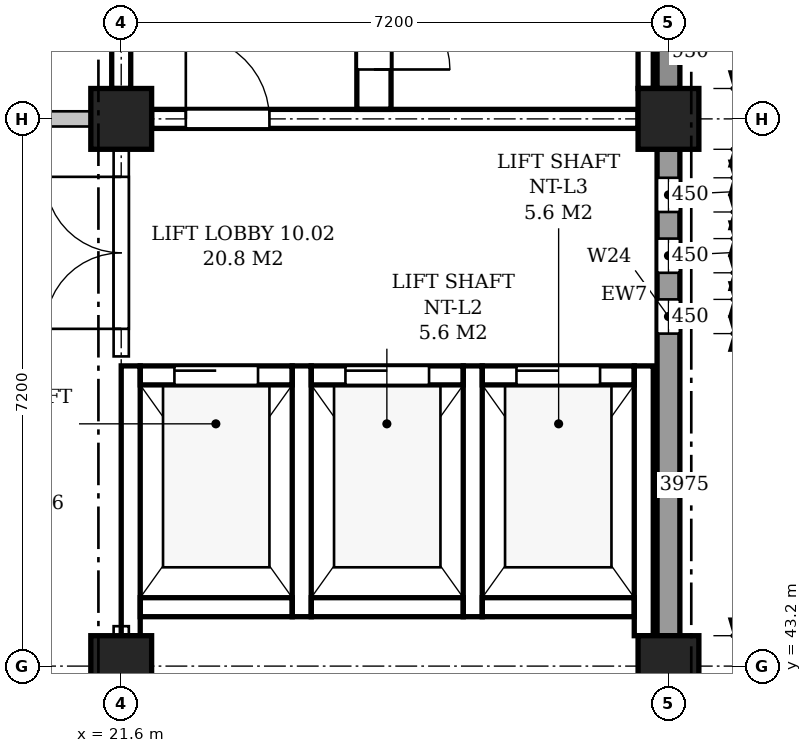
"""IFC4 building model, lengths in metres.
Left out: names, types, materials, properties, quantities, classifications, styles, units other than length and angle.
Written with IfcOpenShell. Run it as: python <this file> out.ifc"""

import sys

from ifc_helpers import new_model, si_unit, direction, frame, frame_2d, origin, origin_2d, place, context, subcontext, project, spatial, polyline, rectangle, outline, extrude, element, fill, save


model = new_model("IFC4")
c1 = context("Model", 3, precision=1e-05, world=origin(), true_north=direction((0.0, 1.0)))
c2 = subcontext(c1, "Body", "Model", "MODEL_VIEW")
j1 = project(units=[si_unit("LENGTHUNIT", "METRE"), si_unit("PLANEANGLEUNIT", "RADIAN")], contexts=[c1])
p1 = place(None, origin())
s1 = spatial("IfcSite", under=j1, at=p1, CompositionType="ELEMENT")
p2 = place(p1, origin())
s2 = spatial("IfcBuilding", under=s1, at=p2, CompositionType="ELEMENT")
p3 = place(p2, frame((0.0, 0.0, 49.8)))
s3 = spatial("IfcBuildingStorey", under=s2, at=p3, CompositionType="ELEMENT", Elevation=49.8)
for number, where, z_axis, x_axis in (
    (1, (21.6, 43.2, 0.0), (0.0, 0.0, 1.0), (1.0, 0.0, 0.0)),
    (2, (21.6, 50.4, 0.0), (0.0, 0.0, 1.0), (1.0, 0.0, 0.0)),
    (3, (28.8, 43.2, 0.0), (0.0, 0.0, 1.0), (1.0, 0.0, 0.0)),
    (4, (28.8, 50.4, 0.0), (0.0, 0.0, 1.0), (1.0, 0.0, 0.0)),
):
    element("IfcColumn", number, at=place(p3, frame(where, z_axis=z_axis, x_axis=x_axis)), inside=s3, PredefinedType="COLUMN", context=c2, shape_type="SweptSolid", body=[
        extrude(rectangle(XDim=0.8, YDim=0.8, at=origin_2d()), origin(), (0.0, 0.0, 1.0), 4.5),
    ])
p4 = place(p3, frame((28.8, 43.6, 0.0), z_axis=(0.0, 0.0, 1.0), x_axis=(0.0, 1.0, 0.0)))
e5 = element("IfcWall", 5, at=p4, inside=s3, PredefinedType="STANDARD", context=c2, shape_type="SweptSolid", body=[
    extrude(rectangle(XDim=6.4, YDim=0.3, at=frame_2d((3.2, 0.0))), origin(), (0.0, 0.0, 1.0), 3.6),
])
p5 = place(p4, frame((3.975, 0.0, 0.9)))
e6 = element("IfcOpeningElement", 6, at=p5, cuts=e5, PredefinedType="OPENING", context=c2, shape_type="SweptSolid", body=[
    extrude(outline(polyline([(0.0, 0.0), (0.45, 0.0), (0.45, 2.35), (0.225, 2.6), (0.0, 2.35), (0.0, 0.0)])), frame((0.0, 0.16, 0.0), z_axis=(0.0, -1.0, 0.0), x_axis=(1.0, 0.0, 0.0)), (0.0, 0.0, 1.0), 0.32),
])
p6 = place(p4, frame((4.775, 0.0, 0.9)))
e7 = element("IfcOpeningElement", 7, at=p6, cuts=e5, PredefinedType="OPENING", context=c2, shape_type="SweptSolid", body=[
    extrude(outline(polyline([(0.0, 0.0), (0.45, 0.0), (0.45, 2.35), (0.225, 2.6), (0.0, 2.35), (0.0, 0.0)])), frame((0.0, 0.16, 0.0), z_axis=(0.0, -1.0, 0.0), x_axis=(1.0, 0.0, 0.0)), (0.0, 0.0, 1.0), 0.32),
])
p7 = place(p4, frame((5.575, 0.0, 0.9)))
e8 = element("IfcOpeningElement", 8, at=p7, cuts=e5, PredefinedType="OPENING", context=c2, shape_type="SweptSolid", body=[
    extrude(outline(polyline([(0.0, 0.0), (0.45, 0.0), (0.45, 2.35), (0.225, 2.6), (0.0, 2.35), (0.0, 0.0)])), frame((0.0, 0.16, 0.0), z_axis=(0.0, -1.0, 0.0), x_axis=(1.0, 0.0, 0.0)), (0.0, 0.0, 1.0), 0.32),
])
p8 = place(p3, frame((28.8, 50.8, 0.0), z_axis=(0.0, 0.0, 1.0), x_axis=(0.0, 1.0, 0.0)))
e9 = element("IfcWall", 9, at=p8, inside=s3, PredefinedType="STANDARD", context=c2, shape_type="SweptSolid", body=[
    extrude(rectangle(XDim=6.4, YDim=0.3, at=frame_2d((3.2, 0.0))), origin(), (0.0, 0.0, 1.0), 3.6),
])
p9 = place(p8, frame((0.95, 0.0, 0.9)))
e10 = element("IfcOpeningElement", 10, at=p9, cuts=e9, PredefinedType="OPENING", context=c2, shape_type="SweptSolid", body=[
    extrude(outline(polyline([(0.0, 0.0), (0.9, 0.0), (0.9, 2.15), (0.45, 2.6), (0.0, 2.15), (0.0, 0.0)])), frame((0.0, 0.16, 0.0), z_axis=(0.0, -1.0, 0.0), x_axis=(1.0, 0.0, 0.0)), (0.0, 0.0, 1.0), 0.32),
])
p10 = place(p8, frame((4.55, 0.0, 0.9)))
e11 = element("IfcOpeningElement", 11, at=p10, cuts=e9, PredefinedType="OPENING", context=c2, shape_type="SweptSolid", body=[
    extrude(outline(polyline([(0.0, 0.0), (0.9, 0.0), (0.9, 2.15), (0.45, 2.6), (0.0, 2.15), (0.0, 0.0)])), frame((0.0, 0.16, 0.0), z_axis=(0.0, -1.0, 0.0), x_axis=(1.0, 0.0, 0.0)), (0.0, 0.0, 1.0), 0.32),
])
p11 = place(p3, frame((22.0, 50.4, 0.0), z_axis=(0.0, 0.0, 1.0), x_axis=(1.0, 0.0, 0.0)))
e12 = element("IfcWall", 12, at=p11, inside=s3, PredefinedType="SHEAR", context=c2, shape_type="SweptSolid", body=[
    extrude(rectangle(XDim=6.4, YDim=0.25, at=frame_2d((3.2, 0.0))), origin(), (0.0, 0.0, 1.0), 3.55),
])
p12 = place(p11, frame((0.45, 0.0, 0.0)))
e13 = element("IfcOpeningElement", 13, at=p12, cuts=e12, PredefinedType="OPENING", context=c2, shape_type="SweptSolid", body=[
    extrude(rectangle(XDim=1.1, YDim=2.1, at=frame_2d((0.55, 1.05))), frame((0.0, 0.135, 0.0), z_axis=(0.0, -1.0, 0.0), x_axis=(1.0, 0.0, 0.0)), (0.0, 0.0, 1.0), 0.27),
])
p13 = place(p3, frame((21.6, 50.8, 0.0), z_axis=(0.0, 0.0, 1.0), x_axis=(0.0, 1.0, 0.0)))
e14 = element("IfcWall", 14, at=p13, inside=s3, PredefinedType="SHEAR", context=c2, shape_type="SweptSolid", body=[
    extrude(rectangle(XDim=6.4, YDim=0.25, at=frame_2d((3.2, 0.0))), origin(), (0.0, 0.0, 1.0), 3.55),
])
p14 = place(p3, frame((28.5, 50.8, -0.25), z_axis=(0.0, 0.0, 1.0), x_axis=(0.0, 1.0, 0.0)))
e15 = element("IfcWall", 15, at=p14, inside=s3, PredefinedType="SHEAR", context=c2, shape_type="SweptSolid", body=[
    extrude(rectangle(XDim=0.95, YDim=0.2, at=frame_2d((0.475, 0.0))), origin(), (0.0, 0.0, 1.0), 4.45),
])
p15 = place(p3, frame((24.925, 50.525, 0.0), z_axis=(0.0, 0.0, 1.0), x_axis=(0.0, 1.0, 0.0)))
e16 = element("IfcWall", 16, at=p15, inside=s3, PredefinedType="SHEAR", context=c2, shape_type="SweptSolid", body=[
    extrude(rectangle(XDim=6.925, YDim=0.45, at=frame_2d((3.462, 0.0))), origin(), (0.0, 0.0, 1.0), 4.2),
])
p16 = place(p15, frame((0.525, 0.0, 0.0)))
e17 = element("IfcOpeningElement", 17, at=p16, cuts=e16, PredefinedType="OPENING", context=c2, shape_type="SweptSolid", body=[
    extrude(rectangle(XDim=1.0, YDim=2.1, at=frame_2d((0.5, 1.05))), frame((0.0, 0.235, 0.0), z_axis=(0.0, -1.0, 0.0), x_axis=(1.0, 0.0, 0.0)), (0.0, 0.0, 1.0), 0.47),
])
p17 = place(p3, frame((21.725, 43.6, -0.25), z_axis=(0.0, 0.0, 1.0), x_axis=(0.0, 1.0, 0.0)))
e18 = element("IfcWall", 18, at=p17, inside=s3, PredefinedType="SHEAR", context=c2, shape_type="SweptSolid", body=[
    extrude(rectangle(XDim=3.55, YDim=0.25, at=frame_2d((1.775, 0.0))), origin(), (0.0, 0.0, 1.0), 3.8),
])
for number, where, z_axis, x_axis in (
    (19, (23.975, 43.85, -0.25), (0.0, 0.0, 1.0), (0.0, 1.0, 0.0)),
    (20, (26.225, 43.85, -0.25), (0.0, 0.0, 1.0), (0.0, 1.0, 0.0)),
):
    element("IfcWall", number, at=place(p3, frame(where, z_axis=z_axis, x_axis=x_axis)), inside=s3, PredefinedType="SHEAR", context=c2, shape_type="SweptSolid", body=[
        extrude(rectangle(XDim=3.3, YDim=0.25, at=frame_2d((1.65, 0.0))), origin(), (0.0, 0.0, 1.0), 4.45),
    ])
p18 = place(p3, frame((28.475, 43.6, -0.25), z_axis=(0.0, 0.0, 1.0), x_axis=(0.0, 1.0, 0.0)))
e21 = element("IfcWall", 21, at=p18, inside=s3, PredefinedType="SHEAR", context=c2, shape_type="SweptSolid", body=[
    extrude(rectangle(XDim=3.55, YDim=0.25, at=frame_2d((1.775, 0.0))), origin(), (0.0, 0.0, 1.0), 4.45),
])
p19 = place(p3, frame((21.85, 47.025, -0.25), z_axis=(0.0, 0.0, 1.0), x_axis=(1.0, 0.0, 0.0)))
e22 = element("IfcWall", 22, at=p19, inside=s3, PredefinedType="SHEAR", context=c2, shape_type="SweptSolid", body=[
    extrude(rectangle(XDim=2.0, YDim=0.25, at=frame_2d((1.0, 0.0))), origin(), (0.0, 0.0, 1.0), 4.45),
])
p20 = place(p19, frame((0.45, 0.0, 0.25)))
e23 = element("IfcOpeningElement", 23, at=p20, cuts=e22, PredefinedType="OPENING", context=c2, shape_type="SweptSolid", body=[
    extrude(rectangle(XDim=1.1, YDim=2.1, at=frame_2d((0.55, 1.05))), frame((0.0, 0.135, 0.0), z_axis=(0.0, -1.0, 0.0), x_axis=(1.0, 0.0, 0.0)), (0.0, 0.0, 1.0), 0.27),
])
p21 = place(p3, frame((21.85, 43.975, -0.25), z_axis=(0.0, 0.0, 1.0), x_axis=(1.0, 0.0, 0.0)))
e24 = element("IfcWall", 24, at=p21, inside=s3, PredefinedType="SHEAR", context=c2, shape_type="SweptSolid", body=[
    extrude(rectangle(XDim=2.0, YDim=0.25, at=frame_2d((1.0, 0.0))), origin(), (0.0, 0.0, 1.0), 4.45),
])
p22 = place(p3, frame((24.1, 47.025, -0.25), z_axis=(0.0, 0.0, 1.0), x_axis=(1.0, 0.0, 0.0)))
e25 = element("IfcWall", 25, at=p22, inside=s3, PredefinedType="SHEAR", context=c2, shape_type="SweptSolid", body=[
    extrude(rectangle(XDim=2.0, YDim=0.25, at=frame_2d((1.0, 0.0))), origin(), (0.0, 0.0, 1.0), 4.45),
])
p23 = place(p22, frame((0.45, 0.0, 0.25)))
e26 = element("IfcOpeningElement", 26, at=p23, cuts=e25, PredefinedType="OPENING", context=c2, shape_type="SweptSolid", body=[
    extrude(rectangle(XDim=1.1, YDim=2.1, at=frame_2d((0.55, 1.05))), frame((0.0, 0.135, 0.0), z_axis=(0.0, -1.0, 0.0), x_axis=(1.0, 0.0, 0.0)), (0.0, 0.0, 1.0), 0.27),
])
p24 = place(p3, frame((24.1, 43.975, -0.25), z_axis=(0.0, 0.0, 1.0), x_axis=(1.0, 0.0, 0.0)))
e27 = element("IfcWall", 27, at=p24, inside=s3, PredefinedType="SHEAR", context=c2, shape_type="SweptSolid", body=[
    extrude(rectangle(XDim=2.0, YDim=0.25, at=frame_2d((1.0, 0.0))), origin(), (0.0, 0.0, 1.0), 4.45),
])
p25 = place(p3, frame((26.35, 47.025, -0.25), z_axis=(0.0, 0.0, 1.0), x_axis=(1.0, 0.0, 0.0)))
e28 = element("IfcWall", 28, at=p25, inside=s3, PredefinedType="SHEAR", context=c2, shape_type="SweptSolid", body=[
    extrude(rectangle(XDim=2.0, YDim=0.25, at=frame_2d((1.0, 0.0))), origin(), (0.0, 0.0, 1.0), 4.45),
])
p26 = place(p25, frame((0.45, 0.0, 0.25)))
e29 = element("IfcOpeningElement", 29, at=p26, cuts=e28, PredefinedType="OPENING", context=c2, shape_type="SweptSolid", body=[
    extrude(rectangle(XDim=1.1, YDim=2.1, at=frame_2d((0.55, 1.05))), frame((0.0, 0.135, 0.0), z_axis=(0.0, -1.0, 0.0), x_axis=(1.0, 0.0, 0.0)), (0.0, 0.0, 1.0), 0.27),
])
p27 = place(p3, frame((26.35, 43.975, -0.25), z_axis=(0.0, 0.0, 1.0), x_axis=(1.0, 0.0, 0.0)))
e30 = element("IfcWall", 30, at=p27, inside=s3, PredefinedType="SHEAR", context=c2, shape_type="SweptSolid", body=[
    extrude(rectangle(XDim=2.0, YDim=0.25, at=frame_2d((1.0, 0.0))), origin(), (0.0, 0.0, 1.0), 4.45),
])
p28 = place(p3, frame((14.8, 50.4, 0.0), z_axis=(0.0, 0.0, 1.0), x_axis=(1.0, 0.0, 0.0)))
e31 = element("IfcWall", 31, at=p28, inside=s3, PredefinedType="PARTITIONING", context=c2, shape_type="SweptSolid", body=[
    extrude(rectangle(XDim=6.4, YDim=0.2, at=frame_2d((3.2, 0.0))), origin(), (0.0, 0.0, 1.0), 3.55),
])
p29 = place(p28, frame((4.3, 0.0, 0.0)))
e32 = element("IfcOpeningElement", 32, at=p29, cuts=e31, PredefinedType="OPENING", context=c2, shape_type="SweptSolid", body=[
    extrude(rectangle(XDim=1.0, YDim=2.1, at=frame_2d((0.5, 1.05))), frame((0.0, 0.11, 0.0), z_axis=(0.0, -1.0, 0.0), x_axis=(1.0, 0.0, 0.0)), (0.0, 0.0, 1.0), 0.22),
])
p30 = place(p3, frame((21.6, 43.6, 0.0), z_axis=(0.0, 0.0, 1.0), x_axis=(0.0, 1.0, 0.0)))
e33 = element("IfcWall", 33, at=p30, inside=s3, PredefinedType="PARTITIONING", context=c2, shape_type="SweptSolid", body=[
    extrude(rectangle(XDim=0.125, YDim=0.2, at=frame_2d((0.062, 0.0))), origin(), (0.0, 0.0, 1.0), 3.55),
])
p31 = place(p3, frame((21.6, 47.275, 0.0), z_axis=(0.0, 0.0, 1.0), x_axis=(0.0, 1.0, 0.0)))
e34 = element("IfcWall", 34, at=p31, inside=s3, PredefinedType="PARTITIONING", context=c2, shape_type="SweptSolid", body=[
    extrude(rectangle(XDim=2.725, YDim=0.2, at=frame_2d((1.363, 0.0))), origin(), (0.0, 0.0, 1.0), 3.55),
])
p32 = place(p31, frame((0.363, 0.0, 0.0)))
e35 = element("IfcOpeningElement", 35, at=p32, cuts=e34, PredefinedType="OPENING", context=c2, shape_type="SweptSolid", body=[
    extrude(rectangle(XDim=2.0, YDim=2.4, at=frame_2d((1.0, 1.2))), frame((0.0, 0.11, 0.0), z_axis=(0.0, -1.0, 0.0), x_axis=(1.0, 0.0, 0.0)), (0.0, 0.0, 1.0), 0.22),
])
p33 = place(p5, origin())
e36 = element("IfcWindow", 36, at=p33, inside=s3, PartitioningType="SINGLE_PANEL", PredefinedType="WINDOW", context=c2, shape_type="SweptSolid", body=[
    extrude(outline(polyline([(0.0, 0.0), (0.45, 0.0), (0.45, 2.35), (0.225, 2.6), (0.0, 2.35), (0.0, 0.0)])), frame((0.0, 0.03, 0.0), z_axis=(0.0, -1.0, 0.0), x_axis=(1.0, 0.0, 0.0)), (0.0, 0.0, 1.0), 0.06),
])
fill(e6, e36)
p34 = place(p6, origin())
e37 = element("IfcWindow", 37, at=p34, inside=s3, PartitioningType="SINGLE_PANEL", PredefinedType="WINDOW", context=c2, shape_type="SweptSolid", body=[
    extrude(outline(polyline([(0.0, 0.0), (0.45, 0.0), (0.45, 2.35), (0.225, 2.6), (0.0, 2.35), (0.0, 0.0)])), frame((0.0, 0.03, 0.0), z_axis=(0.0, -1.0, 0.0), x_axis=(1.0, 0.0, 0.0)), (0.0, 0.0, 1.0), 0.06),
])
fill(e7, e37)
p35 = place(p7, origin())
e38 = element("IfcWindow", 38, at=p35, inside=s3, PartitioningType="SINGLE_PANEL", PredefinedType="WINDOW", context=c2, shape_type="SweptSolid", body=[
    extrude(outline(polyline([(0.0, 0.0), (0.45, 0.0), (0.45, 2.35), (0.225, 2.6), (0.0, 2.35), (0.0, 0.0)])), frame((0.0, 0.03, 0.0), z_axis=(0.0, -1.0, 0.0), x_axis=(1.0, 0.0, 0.0)), (0.0, 0.0, 1.0), 0.06),
])
fill(e8, e38)
p36 = place(p16, frame((1.0, 0.0, 0.0), z_axis=(0.0, 0.0, 1.0), x_axis=(-1.0, 0.0, 0.0)))
e39 = element("IfcDoor", 39, at=p36, inside=s3, OperationType="SINGLE_SWING_RIGHT", PredefinedType="DOOR", context=c2, shape_type="SweptSolid", body=[
    extrude(rectangle(XDim=1.0, YDim=2.1, at=frame_2d((0.5, 1.05))), frame((0.0, 0.025, 0.0), z_axis=(0.0, -1.0, 0.0), x_axis=(1.0, 0.0, 0.0)), (0.0, 0.0, 1.0), 0.05),
])
fill(e17, e39)
p37 = place(p12, origin())
e40 = element("IfcDoor", 40, at=p37, inside=s3, OperationType="SINGLE_SWING_LEFT", PredefinedType="DOOR", context=c2, shape_type="SweptSolid", body=[
    extrude(rectangle(XDim=1.1, YDim=2.1, at=frame_2d((0.55, 1.05))), frame((0.0, 0.025, 0.0), z_axis=(0.0, -1.0, 0.0), x_axis=(1.0, 0.0, 0.0)), (0.0, 0.0, 1.0), 0.05),
])
fill(e13, e40)
p38 = place(p20, origin())
e41 = element("IfcDoor", 41, at=p38, inside=s3, OperationType="SLIDING_TO_LEFT", PredefinedType="DOOR", context=c2, shape_type="SweptSolid", body=[
    extrude(rectangle(XDim=1.1, YDim=2.1, at=frame_2d((0.55, 1.05))), frame((0.0, 0.025, 0.0), z_axis=(0.0, -1.0, 0.0), x_axis=(1.0, 0.0, 0.0)), (0.0, 0.0, 1.0), 0.05),
])
fill(e23, e41)
p39 = place(p23, origin())
e42 = element("IfcDoor", 42, at=p39, inside=s3, OperationType="SLIDING_TO_LEFT", PredefinedType="DOOR", context=c2, shape_type="SweptSolid", body=[
    extrude(rectangle(XDim=1.1, YDim=2.1, at=frame_2d((0.55, 1.05))), frame((0.0, 0.025, 0.0), z_axis=(0.0, -1.0, 0.0), x_axis=(1.0, 0.0, 0.0)), (0.0, 0.0, 1.0), 0.05),
])
fill(e26, e42)
p40 = place(p26, origin())
e43 = element("IfcDoor", 43, at=p40, inside=s3, OperationType="SLIDING_TO_LEFT", PredefinedType="DOOR", context=c2, shape_type="SweptSolid", body=[
    extrude(rectangle(XDim=1.1, YDim=2.1, at=frame_2d((0.55, 1.05))), frame((0.0, 0.025, 0.0), z_axis=(0.0, -1.0, 0.0), x_axis=(1.0, 0.0, 0.0)), (0.0, 0.0, 1.0), 0.05),
])
fill(e29, e43)
p41 = place(p32, origin())
e44 = element("IfcDoor", 44, at=p41, inside=s3, OperationType="DOUBLE_DOOR_SINGLE_SWING", PredefinedType="DOOR", context=c2, shape_type="SweptSolid", body=[
    extrude(rectangle(XDim=2.0, YDim=2.4, at=frame_2d((1.0, 1.2))), frame((0.0, 0.025, 0.0), z_axis=(0.0, -1.0, 0.0), x_axis=(1.0, 0.0, 0.0)), (0.0, 0.0, 1.0), 0.05),
])
fill(e35, e44)
save(model, sys.argv[1])
